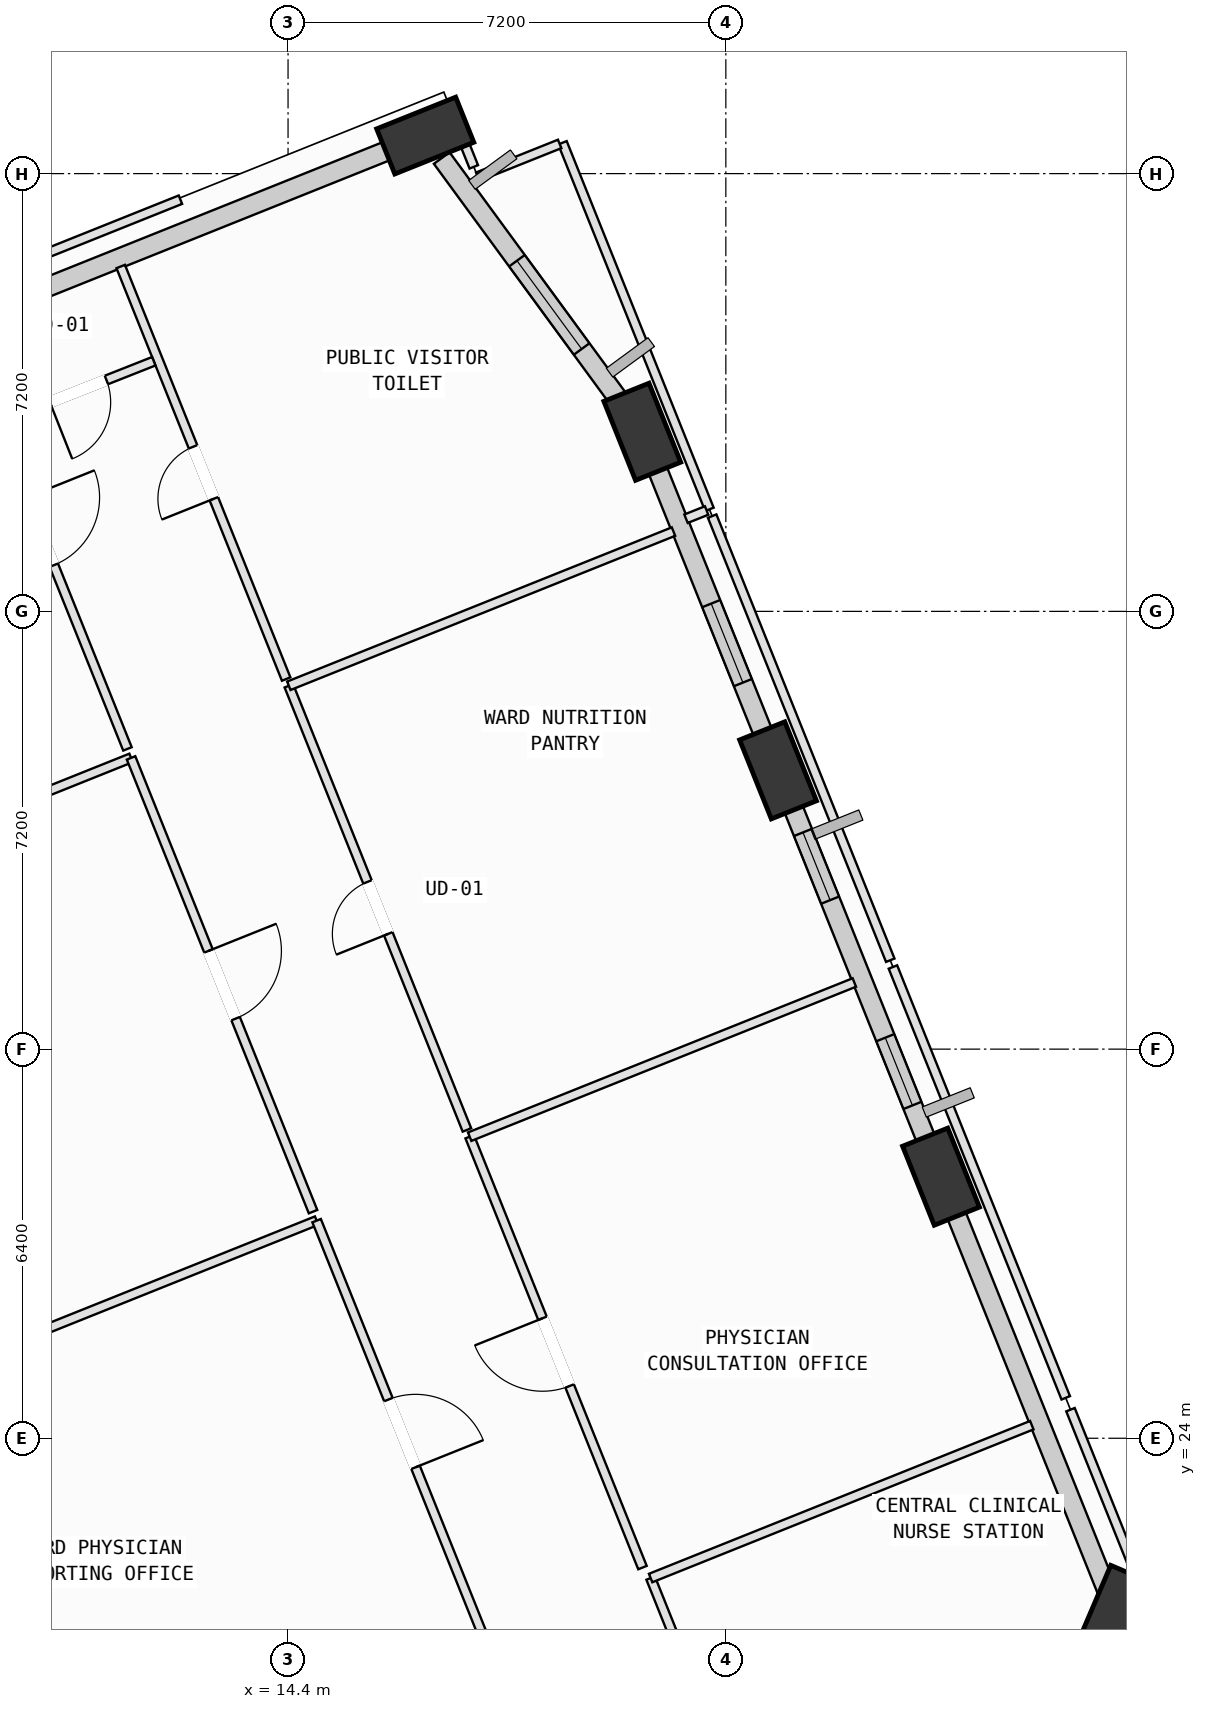
"""IFC4 building model, lengths in metres.
Left out: names, types, materials, properties, quantities, classifications, styles, units other than length and angle.
Written with IfcOpenShell. Run it as: python <this file> out.ifc"""

import sys

from ifc_helpers import new_model, si_unit, direction, frame, frame_2d, origin, origin_2d, place, context, subcontext, project, spatial, rectangle, extrude, element, fill, save


model = new_model("IFC4")
c1 = context("Model", 3, precision=1e-05, world=origin(), true_north=direction((0.0, 1.0)))
c2 = subcontext(c1, "Body", "Model", "MODEL_VIEW")
j1 = project(units=[si_unit("LENGTHUNIT", "METRE"), si_unit("PLANEANGLEUNIT", "RADIAN")], contexts=[c1])
p1 = place(None, origin())
s1 = spatial("IfcSite", under=j1, at=p1, CompositionType="ELEMENT")
p2 = place(p1, origin())
s2 = spatial("IfcBuilding", under=s1, at=p2, CompositionType="ELEMENT")
p3 = place(p2, frame((0.0, 0.0, 116.4)))
s3 = spatial("IfcBuildingStorey", under=s2, at=p3, CompositionType="ELEMENT", Elevation=116.4)
p4 = place(p3, frame((28.023, 21.109, 0.002), z_axis=(0.015511177692, -0.022961428395, 0.999616014364), x_axis=(-0.188731248776, 0.981698205068, 0.025478420325)))
e1 = element("IfcColumn", 1, at=p4, inside=s3, PredefinedType="COLUMN", context=c2, shape_type="SweptSolid", body=[
    extrude(rectangle(XDim=1.4, YDim=0.8, at=origin_2d()), origin(), (0.0, 0.0, 1.0), 3.998),
])
p5 = place(p3, frame((25.139, 28.302, 0.002), z_axis=(-0.014223979667, -0.035163142868, 0.99928035695), x_axis=(0.002786671308, 0.999376185068, 0.035206181014)))
e2 = element("IfcColumn", 2, at=p5, inside=s3, PredefinedType="COLUMN", context=c2, shape_type="SweptSolid", body=[
    extrude(rectangle(XDim=1.4, YDim=0.8, at=origin_2d()), origin(), (0.0, 0.0, 1.0), 3.999),
])
p6 = place(p3, frame((22.459, 34.985, 0.002), z_axis=(-0.041704903016, -0.046399753209, 0.998051984601), x_axis=(0.342446994742, 0.93775101087, 0.057905935835)))
e3 = element("IfcColumn", 3, at=p6, inside=s3, PredefinedType="COLUMN", context=c2, shape_type="SweptSolid", body=[
    extrude(rectangle(XDim=1.4, YDim=0.8, at=origin_2d()), origin(), (0.0, 0.0, 1.0), 4.004),
])
p7 = place(p3, frame((20.226, 40.554, 0.002), z_axis=(-0.06464168981, -0.055815847039, 0.996346346989), x_axis=(0.456711371128, 0.886076237962, 0.079269313113)))
e4 = element("IfcColumn", 4, at=p7, inside=s3, PredefinedType="COLUMN", context=c2, shape_type="SweptSolid", body=[
    extrude(rectangle(XDim=1.4, YDim=0.8, at=origin_2d()), origin(), (0.0, 0.0, 1.0), 4.011),
])
p8 = place(p3, frame((16.656, 45.426, 0.002), z_axis=(-0.084401583793, -0.070496574665, 0.993934910149), x_axis=(0.878913471383, -0.475222028152, 0.040928398225)))
e5 = element("IfcColumn", 5, at=p8, inside=s3, PredefinedType="COLUMN", context=c2, shape_type="SweptSolid", body=[
    extrude(rectangle(XDim=1.4, YDim=0.8, at=origin_2d()), origin(), (0.0, 0.0, 1.0), 4.021),
])
p9 = place(p3, frame((25.343, 27.794, 0.0), z_axis=(0.0, 0.0, 1.0), x_axis=(0.37216889436, -0.928165025236, 0.0)))
e6 = element("IfcWall", 6, at=p9, inside=s3, PredefinedType="SOLIDWALL", context=c2, shape_type="SweptSolid", body=[
    extrude(rectangle(XDim=6.76, YDim=0.32, at=frame_2d((3.38, 0.0))), origin(), (0.0, 0.0, 1.0), 3.165),
])
p10 = place(p3, frame((22.659, 34.485, 0.0), z_axis=(0.0, 0.0, 1.0), x_axis=(0.372175226891, -0.928162486038, 0.0)))
e7 = element("IfcWall", 7, at=p10, inside=s3, PredefinedType="SOLIDWALL", context=c2, shape_type="SweptSolid", body=[
    extrude(rectangle(XDim=6.223, YDim=0.32, at=frame_2d((3.111, 0.0))), origin(), (0.0, 0.0, 1.0), 3.165),
])
p11 = place(p10, frame((4.199, 0.0, 0.75)))
e8 = element("IfcOpeningElement", 8, at=p11, cuts=e7, PredefinedType="OPENING", context=c2, shape_type="SweptSolid", body=[
    extrude(rectangle(XDim=1.2, YDim=1.75, at=frame_2d((0.6, 0.875))), frame((0.0, 0.17, 0.0), z_axis=(0.0, -1.0, 0.0), x_axis=(1.0, 0.0, 0.0)), (0.0, 0.0, 1.0), 0.34),
])
p12 = place(p10, frame((0.561, 0.0, 0.75)))
e9 = element("IfcOpeningElement", 9, at=p12, cuts=e7, PredefinedType="OPENING", context=c2, shape_type="SweptSolid", body=[
    extrude(rectangle(XDim=1.2, YDim=1.75, at=frame_2d((0.6, 0.875))), frame((0.0, 0.17, 0.0), z_axis=(0.0, -1.0, 0.0), x_axis=(1.0, 0.0, 0.0)), (0.0, 0.0, 1.0), 0.34),
])
p13 = place(p3, frame((20.421, 40.067, 0.0), z_axis=(0.0, 0.0, 1.0), x_axis=(0.372174504676, -0.928162775632, 0.0)))
e10 = element("IfcWall", 10, at=p13, inside=s3, PredefinedType="SOLIDWALL", context=c2, shape_type="SweptSolid", body=[
    extrude(rectangle(XDim=5.047, YDim=0.32, at=frame_2d((2.523, 0.0))), origin(), (0.0, 0.0, 1.0), 3.165),
])
p14 = place(p13, frame((2.521, 0.0, 0.75)))
e11 = element("IfcOpeningElement", 11, at=p14, cuts=e10, PredefinedType="OPENING", context=c2, shape_type="SweptSolid", body=[
    extrude(rectangle(XDim=1.4, YDim=1.85, at=frame_2d((0.7, 0.925))), frame((0.0, 0.17, 0.0), z_axis=(0.0, -1.0, 0.0), x_axis=(1.0, 0.0, 0.0)), (0.0, 0.0, 1.0), 0.34),
])
p15 = place(p3, frame((16.927, 45.056, 0.0), z_axis=(0.0, 0.0, 1.0), x_axis=(0.591043738805, -0.80663950983, 0.0)))
e12 = element("IfcWall", 12, at=p15, inside=s3, PredefinedType="SOLIDWALL", context=c2, shape_type="SweptSolid", body=[
    extrude(rectangle(XDim=5.129, YDim=0.32, at=frame_2d((2.564, 0.0))), origin(), (0.0, 0.0, 1.0), 3.165),
])
p16 = place(p15, frame((2.094, 0.0, 0.75)))
e13 = element("IfcOpeningElement", 13, at=p16, cuts=e12, PredefinedType="OPENING", context=c2, shape_type="SweptSolid", body=[
    extrude(rectangle(XDim=1.8, YDim=2.05, at=frame_2d((0.9, 1.025))), frame((0.0, 0.17, 0.0), z_axis=(0.0, -1.0, 0.0), x_axis=(1.0, 0.0, 0.0)), (0.0, 0.0, 1.0), 0.34),
])
p17 = place(p3, frame((9.293, 42.473, 0.0), z_axis=(0.0, 0.0, 1.0), x_axis=(0.928173670316, 0.372147333366, 0.0)))
e14 = element("IfcWall", 14, at=p17, inside=s3, PredefinedType="SOLIDWALL", context=c2, shape_type="SweptSolid", body=[
    extrude(rectangle(XDim=7.231, YDim=0.32, at=frame_2d((3.615, 0.0))), origin(), (0.0, 0.0, 1.0), 3.165),
])
p18 = place(p3, frame((4.693, 23.498, 0.0), z_axis=(0.0, 0.0, 1.0), x_axis=(0.928153869295, 0.372196715344, 0.0)))
e15 = element("IfcWall", 15, at=p18, inside=s3, PredefinedType="PARTITIONING", context=c2, shape_type="SweptSolid", body=[
    extrude(rectangle(XDim=10.965, YDim=0.15, at=frame_2d((5.482, 0.0))), origin(), (0.0, 0.0, 1.0), 3.78),
])
p19 = place(p3, frame((14.87, 27.579, 0.0), z_axis=(0.0, 0.0, 1.0), x_axis=(0.372222245283, -0.928143631189, 0.0)))
e16 = element("IfcWall", 16, at=p19, inside=s3, PredefinedType="PARTITIONING", context=c2, shape_type="SweptSolid", body=[
    extrude(rectangle(XDim=7.541, YDim=0.15, at=frame_2d((3.771, 0.0))), origin(), (0.0, 0.0, 1.0), 3.78),
])
p20 = place(p19, frame((3.17, 0.0, 0.0)))
e17 = element("IfcOpeningElement", 17, at=p20, cuts=e16, PredefinedType="OPENING", context=c2, shape_type="SweptSolid", body=[
    extrude(rectangle(XDim=1.2, YDim=2.15, at=frame_2d((0.6, 1.075))), frame((0.0, 0.085, 0.0), z_axis=(0.0, -1.0, 0.0), x_axis=(1.0, 0.0, 0.0)), (0.0, 0.0, 1.0), 0.17),
])
p21 = place(p3, frame((1.641, 31.109, 0.0), z_axis=(0.0, 0.0, 1.0), x_axis=(0.928153869295, 0.372196715344, 0.0)))
e18 = element("IfcWall", 18, at=p21, inside=s3, PredefinedType="PARTITIONING", context=c2, shape_type="SweptSolid", body=[
    extrude(rectangle(XDim=10.965, YDim=0.15, at=frame_2d((5.482, 0.0))), origin(), (0.0, 0.0, 1.0), 3.78),
])
p22 = place(p3, frame((11.818, 35.19, 0.0), z_axis=(0.0, 0.0, 1.0), x_axis=(0.372222898555, -0.928143369201, 0.0)))
e19 = element("IfcWall", 19, at=p22, inside=s3, PredefinedType="PARTITIONING", context=c2, shape_type="SweptSolid", body=[
    extrude(rectangle(XDim=8.041, YDim=0.15, at=frame_2d((4.021, 0.0))), origin(), (0.0, 0.0, 1.0), 3.78),
])
p23 = place(p22, frame((3.42, 0.0, 0.0)))
e20 = element("IfcOpeningElement", 20, at=p23, cuts=e19, PredefinedType="OPENING", context=c2, shape_type="SweptSolid", body=[
    extrude(rectangle(XDim=1.2, YDim=2.15, at=frame_2d((0.6, 1.075))), frame((0.0, 0.085, 0.0), z_axis=(0.0, -1.0, 0.0), x_axis=(1.0, 0.0, 0.0)), (0.0, 0.0, 1.0), 0.17),
])
p24 = place(p3, frame((8.889, 42.494, 0.0), z_axis=(0.0, 0.0, 1.0), x_axis=(0.372253112899, -0.92813125146, 0.0)))
e21 = element("IfcWall", 21, at=p24, inside=s3, PredefinedType="PARTITIONING", context=c2, shape_type="SweptSolid", body=[
    extrude(rectangle(XDim=7.71, YDim=0.15, at=frame_2d((3.855, 0.0))), origin(), (0.0, 0.0, 1.0), 2.965),
])
p25 = place(p24, frame((3.255, 0.0, 0.0)))
e22 = element("IfcOpeningElement", 22, at=p25, cuts=e21, PredefinedType="OPENING", context=c2, shape_type="SweptSolid", body=[
    extrude(rectangle(XDim=1.2, YDim=2.15, at=frame_2d((0.6, 1.075))), frame((0.0, 0.085, 0.0), z_axis=(0.0, -1.0, 0.0), x_axis=(1.0, 0.0, 0.0)), (0.0, 0.0, 1.0), 0.17),
])
p26 = place(p3, frame((20.812, 20.58, 0.0), z_axis=(0.0, 0.0, 1.0), x_axis=(-0.371843836614, 0.928295298476, 0.0)))
e23 = element("IfcWall", 23, at=p26, inside=s3, PredefinedType="PARTITIONING", context=c2, shape_type="SweptSolid", body=[
    extrude(rectangle(XDim=1.208, YDim=0.15, at=frame_2d((0.604, 0.0))), origin(), (0.0, 0.0, 1.0), 3.78),
])
p27 = place(p3, frame((20.363, 21.701, 0.0), z_axis=(0.0, 0.0, 1.0), x_axis=(0.928142281739, 0.372225610147, 0.0)))
e24 = element("IfcWall", 24, at=p27, inside=s3, PredefinedType="PARTITIONING", context=c2, shape_type="SweptSolid", body=[
    extrude(rectangle(XDim=6.754, YDim=0.15, at=frame_2d((3.377, 0.0))), origin(), (0.0, 0.0, 1.0), 3.78),
])
p28 = place(p3, frame((27.268, 24.47, 0.0), z_axis=(0.0, 0.0, 1.0), x_axis=(0.372187869695, -0.928157416418, 0.0)))
e25 = element("IfcWall", 25, at=p28, inside=s3, PredefinedType="PARTITIONING", context=c2, shape_type="SweptSolid", body=[
    extrude(rectangle(XDim=2.851, YDim=0.15, at=frame_2d((1.425, 0.0))), origin(), (0.0, 0.0, 1.0), 3.78),
])
p29 = place(p3, frame((20.229, 21.873, 0.0), z_axis=(0.0, 0.0, 1.0), x_axis=(-0.372211937798, 0.928147764831, 0.0)))
e26 = element("IfcWall", 26, at=p29, inside=s3, PredefinedType="PARTITIONING", context=c2, shape_type="SweptSolid", body=[
    extrude(rectangle(XDim=7.635, YDim=0.15, at=frame_2d((3.818, 0.0))), origin(), (0.0, 0.0, 1.0), 3.78),
])
p30 = place(p29, frame((3.218, 0.0, 0.0)))
e27 = element("IfcOpeningElement", 27, at=p30, cuts=e26, PredefinedType="OPENING", context=c2, shape_type="SweptSolid", body=[
    extrude(rectangle(XDim=1.2, YDim=2.15, at=frame_2d((0.6, 1.075))), frame((0.0, 0.085, 0.0), z_axis=(0.0, -1.0, 0.0), x_axis=(1.0, 0.0, 0.0)), (0.0, 0.0, 1.0), 0.17),
])
p31 = place(p3, frame((17.387, 28.96, 0.0), z_axis=(0.0, 0.0, 1.0), x_axis=(0.928184887564, 0.372119355178, 0.0)))
e28 = element("IfcWall", 28, at=p31, inside=s3, PredefinedType="PARTITIONING", context=c2, shape_type="SweptSolid", body=[
    extrude(rectangle(XDim=6.815, YDim=0.15, at=frame_2d((3.408, 0.0))), origin(), (0.0, 0.0, 1.0), 3.78),
])
p32 = place(p3, frame((24.348, 31.751, 0.0), z_axis=(0.0, 0.0, 1.0), x_axis=(0.372256126865, -0.928130042619, 0.0)))
e29 = element("IfcWall", 29, at=p32, inside=s3, PredefinedType="PARTITIONING", context=c2, shape_type="SweptSolid", body=[
    extrude(rectangle(XDim=7.635, YDim=0.15, at=frame_2d((3.817, 0.0))), origin(), (0.0, 0.0, 1.0), 3.78),
])
p33 = place(p3, frame((17.342, 29.071, 0.0), z_axis=(0.0, 0.0, 1.0), x_axis=(-0.372155371127, 0.928170447569, 0.0)))
e30 = element("IfcWall", 30, at=p33, inside=s3, PredefinedType="PARTITIONING", context=c2, shape_type="SweptSolid", body=[
    extrude(rectangle(XDim=7.87, YDim=0.15, at=frame_2d((3.935, 0.0))), origin(), (0.0, 0.0, 1.0), 3.78),
])
p34 = place(p33, frame((3.475, 0.0, 0.0)))
e31 = element("IfcOpeningElement", 31, at=p34, cuts=e30, PredefinedType="OPENING", context=c2, shape_type="SweptSolid", body=[
    extrude(rectangle(XDim=0.92, YDim=2.1, at=frame_2d((0.46, 1.05))), frame((0.0, 0.085, 0.0), z_axis=(0.0, -1.0, 0.0), x_axis=(1.0, 0.0, 0.0)), (0.0, 0.0, 1.0), 0.17),
])
p35 = place(p3, frame((14.413, 36.376, 0.0), z_axis=(0.0, 0.0, 1.0), x_axis=(0.928184887564, 0.372119355178, 0.0)))
e32 = element("IfcWall", 32, at=p35, inside=s3, PredefinedType="PARTITIONING", context=c2, shape_type="SweptSolid", body=[
    extrude(rectangle(XDim=6.815, YDim=0.15, at=frame_2d((3.408, 0.0))), origin(), (0.0, 0.0, 1.0), 3.78),
])
p36 = place(p3, frame((21.375, 39.167, 0.0), z_axis=(0.0, 0.0, 1.0), x_axis=(0.372155371127, -0.928170447569, 0.0)))
e33 = element("IfcWall", 33, at=p36, inside=s3, PredefinedType="PARTITIONING", context=c2, shape_type="SweptSolid", body=[
    extrude(rectangle(XDim=7.87, YDim=0.15, at=frame_2d((3.935, 0.0))), origin(), (0.0, 0.0, 1.0), 3.78),
])
p37 = place(p3, frame((18.913, 45.307, 0.0), z_axis=(0.0, 0.0, 1.0), x_axis=(0.372116390733, -0.928186076036, 0.0)))
e34 = element("IfcWall", 34, at=p37, inside=s3, PredefinedType="PARTITIONING", context=c2, shape_type="SweptSolid", body=[
    extrude(rectangle(XDim=6.495, YDim=0.15, at=frame_2d((3.248, 0.0))), origin(), (0.0, 0.0, 1.0), 3.78),
])
p38 = place(p3, frame((21.284, 39.259, 0.0), z_axis=(0.0, 0.0, 1.0), x_axis=(-0.928983565378, -0.370120973814, 0.0)))
e35 = element("IfcWall", 35, at=p38, inside=s3, PredefinedType="PARTITIONING", context=c2, shape_type="SweptSolid", body=[
    extrude(rectangle(XDim=0.365, YDim=0.15, at=frame_2d((0.182, 0.0))), origin(), (0.0, 0.0, 1.0), 3.78),
])
p39 = place(p3, frame((14.369, 36.487, 0.0), z_axis=(0.0, 0.0, 1.0), x_axis=(-0.372213948796, 0.928146958365, 0.0)))
e36 = element("IfcWall", 36, at=p39, inside=s3, PredefinedType="PARTITIONING", context=c2, shape_type="SweptSolid", body=[
    extrude(rectangle(XDim=7.31, YDim=0.15, at=frame_2d((3.655, 0.0))), origin(), (0.0, 0.0, 1.0), 3.78),
])
p40 = place(p39, frame((3.195, 0.0, 0.0)))
e37 = element("IfcOpeningElement", 37, at=p40, cuts=e36, PredefinedType="OPENING", context=c2, shape_type="SweptSolid", body=[
    extrude(rectangle(XDim=0.92, YDim=2.1, at=frame_2d((0.46, 1.05))), frame((0.0, 0.085, 0.0), z_axis=(0.0, -1.0, 0.0), x_axis=(1.0, 0.0, 0.0)), (0.0, 0.0, 1.0), 0.17),
])
p41 = place(p3, frame((15.934, 45.341, 0.0), z_axis=(0.0, 0.0, 1.0), x_axis=(0.928180478143, 0.372130353498, 0.0)))
e38 = element("IfcWall", 38, at=p41, inside=s3, PredefinedType="PARTITIONING", context=c2, shape_type="SweptSolid", body=[
    extrude(rectangle(XDim=1.252, YDim=0.15, at=frame_2d((0.626, 0.0))), origin(), (0.0, 0.0, 1.0), 3.165),
])
p42 = place(p3, frame((17.115, 45.761, 0.0), z_axis=(0.0, 0.0, 1.0), x_axis=(0.371436649195, -0.928458300429, 0.0)))
e39 = element("IfcWall", 39, at=p42, inside=s3, PredefinedType="PARTITIONING", context=c2, shape_type="SweptSolid", body=[
    extrude(rectangle(XDim=0.916, YDim=0.15, at=frame_2d((0.458, 0.0))), origin(), (0.0, 0.0, 1.0), 3.78),
])
p43 = place(p3, frame((17.52, 44.749, 0.0), z_axis=(0.0, 0.0, 1.0), x_axis=(0.928407040991, 0.371564753763, 0.0)))
e40 = element("IfcWall", 40, at=p43, inside=s3, PredefinedType="PARTITIONING", context=c2, shape_type="SweptSolid", body=[
    extrude(rectangle(XDim=1.451, YDim=0.15, at=frame_2d((0.725, 0.0))), origin(), (0.0, 0.0, 1.0), 3.78),
])
p44 = place(p3, frame((12.192, 41.714, 0.0), z_axis=(0.0, 0.0, 1.0), x_axis=(-0.930010784607, -0.36753223058, 0.0)))
e41 = element("IfcWall", 41, at=p44, inside=s3, PredefinedType="PARTITIONING", context=c2, shape_type="SweptSolid", body=[
    extrude(rectangle(XDim=2.675, YDim=0.15, at=frame_2d((1.337, 0.0))), origin(), (0.0, 0.0, 1.0), 3.78),
])
p45 = place(p44, frame((0.838, 0.0, 0.0)))
e42 = element("IfcOpeningElement", 42, at=p45, cuts=e41, PredefinedType="OPENING", context=c2, shape_type="SweptSolid", body=[
    extrude(rectangle(XDim=1.0, YDim=2.12, at=frame_2d((0.5, 1.06))), frame((0.0, 0.085, 0.0), z_axis=(0.0, -1.0, 0.0), x_axis=(1.0, 0.0, 0.0)), (0.0, 0.0, 1.0), 0.17),
])
p46 = place(p3, frame((7.302, 42.235, 0.0), z_axis=(0.0, 0.0, 1.0), x_axis=(0.928186012977, 0.372116548024, 0.0)))
e43 = element("IfcWall", 43, at=p46, inside=s3, PredefinedType="PARTITIONING", context=c2, shape_type="SweptSolid", body=[
    extrude(rectangle(XDim=5.74, YDim=0.15, at=frame_2d((2.87, 0.0))), origin(), (0.0, 0.0, 1.0), 3.78),
])
p47 = place(p11, origin())
e44 = element("IfcWindow", 44, at=p47, inside=s3, PartitioningType="SINGLE_PANEL", PredefinedType="WINDOW", context=c2, shape_type="SweptSolid", body=[
    extrude(rectangle(XDim=1.2, YDim=1.75, at=frame_2d((0.6, 0.875))), frame((0.0, 0.03, 0.0), z_axis=(0.0, -1.0, 0.0), x_axis=(1.0, 0.0, 0.0)), (0.0, 0.0, 1.0), 0.06),
])
fill(e8, e44)
p48 = place(p12, origin())
e45 = element("IfcWindow", 45, at=p48, inside=s3, PartitioningType="SINGLE_PANEL", PredefinedType="WINDOW", context=c2, shape_type="SweptSolid", body=[
    extrude(rectangle(XDim=1.2, YDim=1.75, at=frame_2d((0.6, 0.875))), frame((0.0, 0.03, 0.0), z_axis=(0.0, -1.0, 0.0), x_axis=(1.0, 0.0, 0.0)), (0.0, 0.0, 1.0), 0.06),
])
fill(e9, e45)
p49 = place(p14, origin())
e46 = element("IfcWindow", 46, at=p49, inside=s3, PartitioningType="SINGLE_PANEL", PredefinedType="WINDOW", context=c2, shape_type="SweptSolid", body=[
    extrude(rectangle(XDim=1.4, YDim=1.85, at=frame_2d((0.7, 0.925))), frame((0.0, 0.03, 0.0), z_axis=(0.0, -1.0, 0.0), x_axis=(1.0, 0.0, 0.0)), (0.0, 0.0, 1.0), 0.06),
])
fill(e11, e46)
p50 = place(p16, origin())
e47 = element("IfcWindow", 47, at=p50, inside=s3, PartitioningType="SINGLE_PANEL", PredefinedType="WINDOW", context=c2, shape_type="SweptSolid", body=[
    extrude(rectangle(XDim=1.8, YDim=2.05, at=frame_2d((0.9, 1.025))), frame((0.0, 0.03, 0.0), z_axis=(0.0, -1.0, 0.0), x_axis=(1.0, 0.0, 0.0)), (0.0, 0.0, 1.0), 0.06),
])
fill(e13, e47)
p51 = place(p20, origin())
e48 = element("IfcDoor", 48, at=p51, inside=s3, OperationType="SINGLE_SWING_RIGHT", PredefinedType="DOOR", context=c2, shape_type="SweptSolid", body=[
    extrude(rectangle(XDim=1.2, YDim=2.15, at=frame_2d((0.6, 1.075))), frame((0.0, 0.025, 0.0), z_axis=(0.0, -1.0, 0.0), x_axis=(1.0, 0.0, 0.0)), (0.0, 0.0, 1.0), 0.05),
])
fill(e17, e48)
p52 = place(p23, origin())
e49 = element("IfcDoor", 49, at=p52, inside=s3, OperationType="SINGLE_SWING_LEFT", PredefinedType="DOOR", context=c2, shape_type="SweptSolid", body=[
    extrude(rectangle(XDim=1.2, YDim=2.15, at=frame_2d((0.6, 1.075))), frame((0.0, 0.025, 0.0), z_axis=(0.0, -1.0, 0.0), x_axis=(1.0, 0.0, 0.0)), (0.0, 0.0, 1.0), 0.05),
])
fill(e20, e49)
p53 = place(p25, origin())
e50 = element("IfcDoor", 50, at=p53, inside=s3, OperationType="SINGLE_SWING_LEFT", PredefinedType="DOOR", context=c2, shape_type="SweptSolid", body=[
    extrude(rectangle(XDim=1.2, YDim=2.15, at=frame_2d((0.6, 1.075))), frame((0.0, 0.025, 0.0), z_axis=(0.0, -1.0, 0.0), x_axis=(1.0, 0.0, 0.0)), (0.0, 0.0, 1.0), 0.05),
])
fill(e22, e50)
p54 = place(p30, origin())
e51 = element("IfcDoor", 51, at=p54, inside=s3, OperationType="SINGLE_SWING_RIGHT", PredefinedType="DOOR", context=c2, shape_type="SweptSolid", body=[
    extrude(rectangle(XDim=1.2, YDim=2.15, at=frame_2d((0.6, 1.075))), frame((0.0, 0.025, 0.0), z_axis=(0.0, -1.0, 0.0), x_axis=(1.0, 0.0, 0.0)), (0.0, 0.0, 1.0), 0.05),
])
fill(e27, e51)
p55 = place(p34, origin())
e52 = element("IfcDoor", 52, at=p55, inside=s3, OperationType="SINGLE_SWING_LEFT", PredefinedType="DOOR", context=c2, shape_type="SweptSolid", body=[
    extrude(rectangle(XDim=0.92, YDim=2.1, at=frame_2d((0.46, 1.05))), frame((0.0, 0.025, 0.0), z_axis=(0.0, -1.0, 0.0), x_axis=(1.0, 0.0, 0.0)), (0.0, 0.0, 1.0), 0.05),
])
fill(e31, e52)
p56 = place(p40, origin())
e53 = element("IfcDoor", 53, at=p56, inside=s3, OperationType="SINGLE_SWING_LEFT", PredefinedType="DOOR", context=c2, shape_type="SweptSolid", body=[
    extrude(rectangle(XDim=0.92, YDim=2.1, at=frame_2d((0.46, 1.05))), frame((0.0, 0.025, 0.0), z_axis=(0.0, -1.0, 0.0), x_axis=(1.0, 0.0, 0.0)), (0.0, 0.0, 1.0), 0.05),
])
fill(e37, e53)
p57 = place(p45, origin())
e54 = element("IfcDoor", 54, at=p57, inside=s3, OperationType="SINGLE_SWING_RIGHT", PredefinedType="DOOR", context=c2, shape_type="SweptSolid", body=[
    extrude(rectangle(XDim=1.0, YDim=2.12, at=frame_2d((0.5, 1.06))), frame((0.0, 0.025, 0.0), z_axis=(0.0, -1.0, 0.0), x_axis=(1.0, 0.0, 0.0)), (0.0, 0.0, 1.0), 0.05),
])
fill(e42, e54)
save(model, sys.argv[1])
